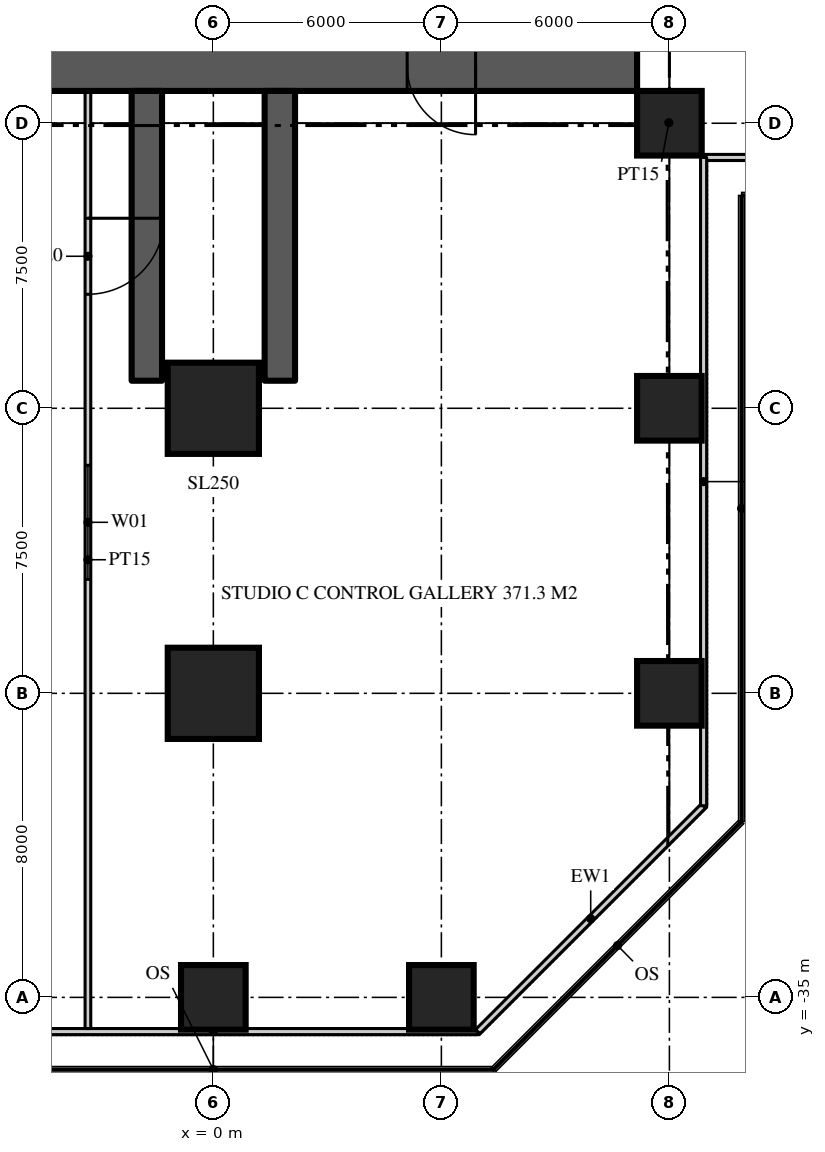
"""IFC4 building model, lengths in metres.
Left out: names, types, materials, properties, quantities, classifications, styles, units other than length and angle.
Written with IfcOpenShell. Run it as: python <this file> out.ifc"""

import sys

from ifc_helpers import new_model, si_unit, direction, frame, frame_2d, origin, origin_2d, place, context, subcontext, project, spatial, rectangle, extrude, element, fill, save


model = new_model("IFC4")
c1 = context("Model", 3, precision=1e-05, world=origin(), true_north=direction((0.0, 1.0)))
c2 = subcontext(c1, "Body", "Model", "MODEL_VIEW")
j1 = project(units=[si_unit("LENGTHUNIT", "METRE"), si_unit("PLANEANGLEUNIT", "RADIAN")], contexts=[c1])
p1 = place(None, origin())
s1 = spatial("IfcSite", under=j1, at=p1, CompositionType="ELEMENT")
p2 = place(p1, origin())
s2 = spatial("IfcBuilding", under=s1, at=p2, CompositionType="ELEMENT")
p3 = place(p2, frame((0.0, 0.0, 7.0)))
s3 = spatial("IfcBuildingStorey", under=s2, at=p3, CompositionType="ELEMENT", Elevation=7.0)
p4 = place(p3, frame((11.15, -10.5, 0.0), z_axis=(0.0, 0.0, 1.0), x_axis=(-1.0, 0.0, 0.0)))
e1 = element("IfcWall", 1, at=p4, inside=s3, PredefinedType="SHEAR", context=c2, shape_type="SweptSolid", body=[
    extrude(rectangle(XDim=22.3, YDim=1.3, at=frame_2d((11.15, 0.0))), origin(), (0.0, 0.0, 1.0), 8.0),
])
p5 = place(p4, frame((16.25, 0.0, 0.0)))
e2 = element("IfcOpeningElement", 2, at=p5, cuts=e1, PredefinedType="OPENING", context=c2, shape_type="SweptSolid", body=[
    extrude(rectangle(XDim=1.8, YDim=2.2, at=frame_2d((0.9, 1.1))), frame((0.0, 0.66, 0.0), z_axis=(0.0, -1.0, 0.0), x_axis=(1.0, 0.0, 0.0)), (0.0, 0.0, 1.0), 1.32),
])
p6 = place(p4, frame((4.25, 0.0, 0.0)))
e3 = element("IfcOpeningElement", 3, at=p6, cuts=e1, PredefinedType="OPENING", context=c2, shape_type="SweptSolid", body=[
    extrude(rectangle(XDim=1.8, YDim=2.2, at=frame_2d((0.9, 1.1))), frame((0.0, 0.66, 0.0), z_axis=(0.0, -1.0, 0.0), x_axis=(1.0, 0.0, 0.0)), (0.0, 0.0, 1.0), 1.32),
])
for number, where, z_axis, x_axis in (
    (4, (-1.75, -11.15, 0.0), (0.0, 0.0, 1.0), (0.0, -1.0, 0.0)),
    (5, (1.75, -11.15, 0.0), (0.0, 0.0, 1.0), (0.0, -1.0, 0.0)),
):
    element("IfcWall", number, at=place(p3, frame(where, z_axis=z_axis, x_axis=x_axis)), inside=s3, PredefinedType="SHEAR", context=c2, shape_type="SweptSolid", body=[
        extrude(rectangle(XDim=7.625, YDim=0.8, at=frame_2d((3.812, 0.0))), origin(), (0.0, 0.0, 1.0), 8.0),
    ])
for number, where, z_axis, x_axis in (
    (6, (0.0, -35.0, 0.0), (0.0, 0.0, 1.0), (1.0, 0.0, 0.0)),
    (7, (6.0, -35.0, 0.0), (0.0, 0.0, 1.0), (1.0, 0.0, 0.0)),
):
    element("IfcColumn", number, at=place(p3, frame(where, z_axis=z_axis, x_axis=x_axis)), inside=s3, PredefinedType="COLUMN", context=c2, shape_type="SweptSolid", body=[
        extrude(rectangle(XDim=1.7, YDim=1.7, at=origin_2d()), origin(), (0.0, 0.0, 1.0), 8.0),
    ])
p7 = place(p3, frame((0.0, -27.0, 0.0), z_axis=(0.0, 0.0, 1.0), x_axis=(1.0, 0.0, 0.0)))
e8 = element("IfcColumn", 8, at=p7, inside=s3, PredefinedType="COLUMN", context=c2, shape_type="SweptSolid", body=[
    extrude(rectangle(XDim=2.4, YDim=2.4, at=origin_2d()), origin(), (0.0, 0.0, 1.0), 8.0),
])
p8 = place(p3, frame((12.0, -27.0, 0.0), z_axis=(0.0, 0.0, 1.0), x_axis=(1.0, 0.0, 0.0)))
e9 = element("IfcColumn", 9, at=p8, inside=s3, PredefinedType="COLUMN", context=c2, shape_type="SweptSolid", body=[
    extrude(rectangle(XDim=1.7, YDim=1.7, at=origin_2d()), origin(), (0.0, 0.0, 1.0), 8.0),
])
p9 = place(p3, frame((0.0, -19.5, 0.0), z_axis=(0.0, 0.0, 1.0), x_axis=(1.0, 0.0, 0.0)))
e10 = element("IfcColumn", 10, at=p9, inside=s3, PredefinedType="COLUMN", context=c2, shape_type="SweptSolid", body=[
    extrude(rectangle(XDim=2.4, YDim=2.4, at=origin_2d()), origin(), (0.0, 0.0, 1.0), 8.0),
])
for number, where, z_axis, x_axis in (
    (11, (12.0, -19.5, 0.0), (0.0, 0.0, 1.0), (1.0, 0.0, 0.0)),
    (12, (12.0, -12.0, 0.0), (0.0, 0.0, 1.0), (1.0, 0.0, 0.0)),
):
    element("IfcColumn", number, at=place(p3, frame(where, z_axis=z_axis, x_axis=x_axis)), inside=s3, PredefinedType="COLUMN", context=c2, shape_type="SweptSolid", body=[
        extrude(rectangle(XDim=1.7, YDim=1.7, at=origin_2d()), origin(), (0.0, 0.0, 1.0), 8.0),
    ])
p10 = place(p3, frame((12.9, -12.9, 0.0), z_axis=(0.0, 0.0, 1.0), x_axis=(1.0, 0.0, 0.0)))
e13 = element("IfcWall", 13, at=p10, inside=s3, PredefinedType="SOLIDWALL", context=c2, shape_type="SweptSolid", body=[
    extrude(rectangle(XDim=17.059, YDim=0.16, at=frame_2d((8.529, 0.0))), origin(), (0.0, 0.0, 1.0), 7.75),
])
p11 = place(p3, frame((-6.958, -35.9, 0.0), z_axis=(0.0, 0.0, 1.0), x_axis=(1.0, 0.0, 0.0)))
e14 = element("IfcWall", 14, at=p11, inside=s3, PredefinedType="SOLIDWALL", context=c2, shape_type="SweptSolid", body=[
    extrude(rectangle(XDim=13.917, YDim=0.16, at=frame_2d((6.958, 0.0))), origin(), (0.0, 0.0, 1.0), 7.75),
])
p12 = place(p3, frame((6.958, -35.9, 0.0), z_axis=(0.0, 0.0, 1.0), x_axis=(0.707106781187, 0.707106781187, 0.0)))
e15 = element("IfcWall", 15, at=p12, inside=s3, PredefinedType="SOLIDWALL", context=c2, shape_type="SweptSolid", body=[
    extrude(rectangle(XDim=8.402, YDim=0.16, at=frame_2d((4.201, 0.0))), origin(), (0.0, 0.0, 1.0), 7.75),
])
p13 = place(p3, frame((12.9, -29.958, 0.0), z_axis=(0.0, 0.0, 1.0), x_axis=(0.0, 1.0, 0.0)))
e16 = element("IfcWall", 16, at=p13, inside=s3, PredefinedType="SOLIDWALL", context=c2, shape_type="SweptSolid", body=[
    extrude(rectangle(XDim=17.059, YDim=0.16, at=frame_2d((8.529, 0.0))), origin(), (0.0, 0.0, 1.0), 7.75),
])
p14 = place(p3, frame((-3.3, -11.15, 0.0), z_axis=(0.0, 0.0, 1.0), x_axis=(0.0, -1.0, 0.0)))
e17 = element("IfcWall", 17, at=p14, inside=s3, PredefinedType="PARTITIONING", context=c2, shape_type="SweptSolid", body=[
    extrude(rectangle(XDim=24.67, YDim=0.15, at=frame_2d((12.335, 0.0))), origin(), (0.0, 0.0, 1.0), 7.75),
])
p15 = place(p14, frame((3.35, 0.0, 0.0)))
e18 = element("IfcOpeningElement", 18, at=p15, cuts=e17, PredefinedType="OPENING", context=c2, shape_type="SweptSolid", body=[
    extrude(rectangle(XDim=2.0, YDim=2.6, at=frame_2d((1.0, 1.3))), frame((0.0, 0.085, 0.0), z_axis=(0.0, -1.0, 0.0), x_axis=(1.0, 0.0, 0.0)), (0.0, 0.0, 1.0), 0.17),
])
p16 = place(p14, frame((9.85, 0.0, 0.9)))
e19 = element("IfcOpeningElement", 19, at=p16, cuts=e17, PredefinedType="OPENING", context=c2, shape_type="SweptSolid", body=[
    extrude(rectangle(XDim=3.0, YDim=1.5, at=frame_2d((1.5, 0.75))), frame((0.0, 0.085, 0.0), z_axis=(0.0, -1.0, 0.0), x_axis=(1.0, 0.0, 0.0)), (0.0, 0.0, 1.0), 0.17),
])
p17 = place(p3, frame((11.15, -11.15, 0.0), z_axis=(0.0, 0.0, 1.0), x_axis=(0.707106781187, -0.707106781187, 0.0)))
e20 = element("IfcWall", 20, at=p17, inside=s3, PredefinedType="PARTITIONING", context=c2, shape_type="SweptSolid", body=[
    extrude(rectangle(XDim=2.362, YDim=0.15, at=frame_2d((1.181, 0.0))), origin(), (0.0, 0.0, 1.0), 7.75),
])
p18 = place(p6, origin())
e21 = element("IfcDoor", 21, at=p18, inside=s3, OperationType="DOUBLE_DOOR_DOUBLE_SWING", PredefinedType="DOOR", context=c2, shape_type="SweptSolid", body=[
    extrude(rectangle(XDim=1.8, YDim=2.2, at=frame_2d((0.9, 1.1))), frame((0.0, 0.025, 0.0), z_axis=(0.0, -1.0, 0.0), x_axis=(1.0, 0.0, 0.0)), (0.0, 0.0, 1.0), 0.05),
])
fill(e3, e21)
p19 = place(p15, origin())
e22 = element("IfcDoor", 22, at=p19, inside=s3, OperationType="DOUBLE_DOOR_DOUBLE_SWING", PredefinedType="DOOR", context=c2, shape_type="SweptSolid", body=[
    extrude(rectangle(XDim=2.0, YDim=2.6, at=frame_2d((1.0, 1.3))), frame((0.0, 0.025, 0.0), z_axis=(0.0, -1.0, 0.0), x_axis=(1.0, 0.0, 0.0)), (0.0, 0.0, 1.0), 0.05),
])
fill(e18, e22)
p20 = place(p16, origin())
e23 = element("IfcWindow", 23, at=p20, inside=s3, PartitioningType="SINGLE_PANEL", PredefinedType="WINDOW", context=c2, shape_type="SweptSolid", body=[
    extrude(rectangle(XDim=3.0, YDim=1.5, at=frame_2d((1.5, 0.75))), frame((0.0, 0.03, 0.0), z_axis=(0.0, -1.0, 0.0), x_axis=(1.0, 0.0, 0.0)), (0.0, 0.0, 1.0), 0.06),
])
fill(e19, e23)
save(model, sys.argv[1])
